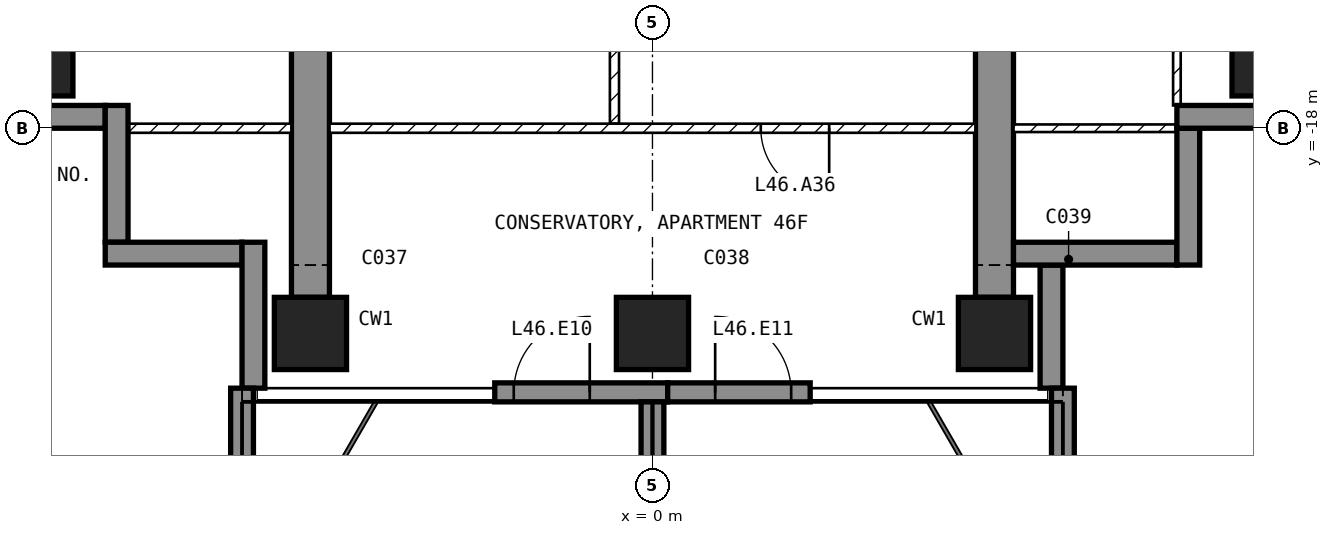
"""IFC4 building model, lengths in metres.
Left out: names, types, materials, properties, quantities, classifications, styles, units other than length and angle.
Written with IfcOpenShell. Run it as: python <this file> out.ifc"""

import sys

from ifc_helpers import new_model, si_unit, direction, frame, frame_2d, origin, origin_2d, place, context, subcontext, project, spatial, polyline, rectangle, outline, extrude, element, fill, save


model = new_model("IFC4")
c1 = context("Model", 3, precision=1e-05, world=origin(), true_north=direction((0.0, 1.0)))
c2 = subcontext(c1, "Body", "Model", "MODEL_VIEW")
j1 = project(units=[si_unit("LENGTHUNIT", "METRE"), si_unit("PLANEANGLEUNIT", "RADIAN")], contexts=[c1])
p1 = place(None, origin())
s1 = spatial("IfcSite", under=j1, at=p1, CompositionType="ELEMENT")
p2 = place(p1, origin())
s2 = spatial("IfcBuilding", under=s1, at=p2, CompositionType="ELEMENT")
p3 = place(p2, frame((0.0, 0.0, 187.6)))
s3 = spatial("IfcBuildingStorey", under=s2, at=p3, CompositionType="ELEMENT", Elevation=187.6)
for number, where, z_axis, x_axis in (
    (1, (-8.1, -17.1, -0.25), (0.0, 0.0, 1.0), (1.0, 0.0, 0.0)),
    (2, (-4.5, -20.7, -0.25), (0.0, 0.0, 1.0), (1.0, 0.0, 0.0)),
    (3, (0.0, -20.7, -0.25), (0.0, 0.0, 1.0), (1.0, 0.0, 0.0)),
    (4, (4.5, -20.7, -0.25), (0.0, 0.0, 1.0), (1.0, 0.0, 0.0)),
    (5, (8.1, -17.1, -0.25), (0.0, 0.0, 1.0), (1.0, 0.0, 0.0)),
):
    element("IfcColumn", number, at=place(p3, frame(where, z_axis=z_axis, x_axis=x_axis)), inside=s3, PredefinedType="COLUMN", context=c2, shape_type="SweptSolid", body=[
        extrude(rectangle(XDim=0.95, YDim=0.95, at=origin_2d()), origin(), (0.0, 0.0, 1.0), 3.5),
    ])
for number, where, z_axis, x_axis in (
    (6, (-4.75, -20.225, -0.25), (1.0, 0.0, 0.0), (0.0, 1.0, 0.0)),
    (7, (4.25, -20.225, -0.25), (1.0, 0.0, 0.0), (0.0, 1.0, 0.0)),
):
    element("IfcWall", number, at=place(p3, frame(where, z_axis=z_axis, x_axis=x_axis)), inside=s3, PredefinedType="SHEAR", context=c2, shape_type="SweptSolid", body=[
        extrude(outline(polyline([(0.0, 0.0), (6.725, 0.0), (6.725, 2.65), (9.125, 2.65), (9.125, 0.0), (11.225, 0.0), (11.225, 3.5), (0.0, 3.5), (0.0, 0.0)])), origin(), (0.0, 0.0, 1.0), 0.5),
    ])
p4 = place(p3, frame((-2.075, -21.475, 0.0), z_axis=(0.0, 0.0, 1.0), x_axis=(1.0, 0.0, 0.0)))
e8 = element("IfcWall", 8, at=p4, inside=s3, PredefinedType="SOLIDWALL", context=c2, shape_type="SweptSolid", body=[
    extrude(rectangle(XDim=2.275, YDim=0.25, at=frame_2d((1.137, 0.0))), origin(), (0.0, 0.0, 1.0), 3.25),
])
p5 = place(p4, frame((0.25, 0.0, 0.0)))
e9 = element("IfcOpeningElement", 9, at=p5, cuts=e8, PredefinedType="OPENING", context=c2, shape_type="SweptSolid", body=[
    extrude(rectangle(XDim=1.0, YDim=2.4, at=frame_2d((0.5, 1.2))), frame((0.0, 0.135, 0.0), z_axis=(0.0, -1.0, 0.0), x_axis=(1.0, 0.0, 0.0)), (0.0, 0.0, 1.0), 0.27),
])
p6 = place(p3, frame((0.2, -21.475, 0.0), z_axis=(0.0, 0.0, 1.0), x_axis=(1.0, 0.0, 0.0)))
e10 = element("IfcWall", 10, at=p6, inside=s3, PredefinedType="SOLIDWALL", context=c2, shape_type="SweptSolid", body=[
    extrude(rectangle(XDim=1.875, YDim=0.25, at=frame_2d((0.938, 0.0))), origin(), (0.0, 0.0, 1.0), 3.25),
])
p7 = place(p6, frame((0.625, 0.0, 0.0)))
e11 = element("IfcOpeningElement", 11, at=p7, cuts=e10, PredefinedType="OPENING", context=c2, shape_type="SweptSolid", body=[
    extrude(rectangle(XDim=1.0, YDim=2.4, at=frame_2d((0.5, 1.2))), frame((0.0, 0.135, 0.0), z_axis=(0.0, -1.0, 0.0), x_axis=(1.0, 0.0, 0.0)), (0.0, 0.0, 1.0), 0.27),
])
p8 = place(p3, frame((5.25, -21.42, 0.0), z_axis=(0.0, 0.0, 1.0), x_axis=(0.0, 1.0, 0.0)))
e12 = element("IfcWall", 12, at=p8, inside=s3, PredefinedType="SOLIDWALL", context=c2, shape_type="SweptSolid", body=[
    extrude(rectangle(XDim=1.62, YDim=0.3, at=frame_2d((0.81, 0.0))), origin(), (0.0, 0.0, 1.0), 3.25),
])
p9 = place(p3, frame((4.75, -19.65, 0.0), z_axis=(0.0, 0.0, 1.0), x_axis=(1.0, 0.0, 0.0)))
e13 = element("IfcWall", 13, at=p9, inside=s3, PredefinedType="SOLIDWALL", context=c2, shape_type="SweptSolid", body=[
    extrude(rectangle(XDim=2.15, YDim=0.3, at=frame_2d((1.075, 0.0))), origin(), (0.0, 0.0, 1.0), 3.25),
])
p10 = place(p3, frame((7.05, -19.8, 0.0), z_axis=(0.0, 0.0, 1.0), x_axis=(0.0, 1.0, 0.0)))
e14 = element("IfcWall", 14, at=p10, inside=s3, PredefinedType="SOLIDWALL", context=c2, shape_type="SweptSolid", body=[
    extrude(rectangle(XDim=1.8, YDim=0.3, at=frame_2d((0.9, 0.0))), origin(), (0.0, 0.0, 1.0), 3.25),
])
p11 = place(p3, frame((6.9, -17.85, 0.0), z_axis=(0.0, 0.0, 1.0), x_axis=(1.0, 0.0, 0.0)))
e15 = element("IfcWall", 15, at=p11, inside=s3, PredefinedType="SOLIDWALL", context=c2, shape_type="SweptSolid", body=[
    extrude(rectangle(XDim=1.85, YDim=0.3, at=frame_2d((0.925, 0.0))), origin(), (0.0, 0.0, 1.0), 3.25),
])
p12 = place(p3, frame((-8.75, -17.85, 0.0), z_axis=(0.0, 0.0, 1.0), x_axis=(1.0, 0.0, 0.0)))
e16 = element("IfcWall", 16, at=p12, inside=s3, PredefinedType="SOLIDWALL", context=c2, shape_type="SweptSolid", body=[
    extrude(rectangle(XDim=1.55, YDim=0.3, at=frame_2d((0.775, 0.0))), origin(), (0.0, 0.0, 1.0), 3.25),
])
for number, where, z_axis, x_axis in (
    (17, (-7.05, -17.7, 0.0), (0.0, 0.0, 1.0), (0.0, -1.0, 0.0)),
    (18, (-7.2, -19.65, 0.0), (0.0, 0.0, 1.0), (1.0, 0.0, 0.0)),
):
    element("IfcWall", number, at=place(p3, frame(where, z_axis=z_axis, x_axis=x_axis)), inside=s3, PredefinedType="SOLIDWALL", context=c2, shape_type="SweptSolid", body=[
        extrude(rectangle(XDim=1.8, YDim=0.3, at=frame_2d((0.9, 0.0))), origin(), (0.0, 0.0, 1.0), 3.25),
    ])
p13 = place(p3, frame((-5.25, -19.5, 0.0), z_axis=(0.0, 0.0, 1.0), x_axis=(0.0, -1.0, 0.0)))
e19 = element("IfcWall", 19, at=p13, inside=s3, PredefinedType="SOLIDWALL", context=c2, shape_type="SweptSolid", body=[
    extrude(rectangle(XDim=1.92, YDim=0.3, at=frame_2d((0.96, 0.0))), origin(), (0.0, 0.0, 1.0), 3.25),
])
p14 = place(p3, frame((-5.4, -21.42, 0.0), z_axis=(0.0, 0.0, 1.0), x_axis=(0.0, -1.0, 0.0)))
e20 = element("IfcWall", 20, at=p14, inside=s3, PredefinedType="SOLIDWALL", context=c2, shape_type="SweptSolid", body=[
    extrude(rectangle(XDim=2.88, YDim=0.3, at=frame_2d((1.44, 0.0))), origin(), (0.0, 0.0, 1.0), 3.25),
])
p15 = place(p3, frame((0.0, -21.6, 0.0), z_axis=(0.0, 0.0, 1.0), x_axis=(0.0, -1.0, 0.0)))
e21 = element("IfcWall", 21, at=p15, inside=s3, PredefinedType="SOLIDWALL", context=c2, shape_type="SweptSolid", body=[
    extrude(rectangle(XDim=2.7, YDim=0.3, at=frame_2d((1.35, 0.0))), origin(), (0.0, 0.0, 1.0), 3.25),
])
p16 = place(p3, frame((5.4, -21.42, 0.0), z_axis=(0.0, 0.0, 1.0), x_axis=(0.0, -1.0, 0.0)))
e22 = element("IfcWall", 22, at=p16, inside=s3, PredefinedType="SOLIDWALL", context=c2, shape_type="SweptSolid", body=[
    extrude(rectangle(XDim=2.88, YDim=0.3, at=frame_2d((1.44, 0.0))), origin(), (0.0, 0.0, 1.0), 3.25),
])
p17 = place(p3, frame((-0.5, -17.94, 0.0), z_axis=(0.0, 0.0, 1.0), x_axis=(0.0, 1.0, 0.0)))
e23 = element("IfcWall", 23, at=p17, inside=s3, PredefinedType="PARTITIONING", context=c2, shape_type="SweptSolid", body=[
    extrude(rectangle(XDim=2.88, YDim=0.12, at=frame_2d((1.44, 0.0))), origin(), (0.0, 0.0, 1.0), 3.25),
])
p18 = place(p17, frame((0.99, 0.0, 0.0)))
e24 = element("IfcOpeningElement", 24, at=p18, cuts=e23, PredefinedType="OPENING", context=c2, shape_type="SweptSolid", body=[
    extrude(rectangle(XDim=0.9, YDim=2.1, at=frame_2d((0.45, 1.05))), frame((0.0, 0.07, 0.0), z_axis=(0.0, -1.0, 0.0), x_axis=(1.0, 0.0, 0.0)), (0.0, 0.0, 1.0), 0.14),
])
p19 = place(p3, frame((4.25, -18.0, 0.0), z_axis=(0.0, 0.0, 1.0), x_axis=(-1.0, 0.0, 0.0)))
e25 = element("IfcWall", 25, at=p19, inside=s3, PredefinedType="PARTITIONING", context=c2, shape_type="SweptSolid", body=[
    extrude(rectangle(XDim=8.5, YDim=0.12, at=frame_2d((4.25, 0.0))), origin(), (0.0, 0.0, 1.0), 3.25),
])
p20 = place(p19, frame((1.925, 0.0, 0.0)))
e26 = element("IfcOpeningElement", 26, at=p20, cuts=e25, PredefinedType="OPENING", context=c2, shape_type="SweptSolid", body=[
    extrude(rectangle(XDim=0.9, YDim=2.1, at=frame_2d((0.45, 1.05))), frame((0.0, 0.07, 0.0), z_axis=(0.0, -1.0, 0.0), x_axis=(1.0, 0.0, 0.0)), (0.0, 0.0, 1.0), 0.14),
])
p21 = place(p3, frame((6.9, -17.7, 0.0), z_axis=(0.0, 0.0, 1.0), x_axis=(0.0, 1.0, 0.0)))
e27 = element("IfcWall", 27, at=p21, inside=s3, PredefinedType="PARTITIONING", context=c2, shape_type="SweptSolid", body=[
    extrude(rectangle(XDim=3.25, YDim=0.1, at=frame_2d((1.625, 0.0))), origin(), (0.0, 0.0, 1.0), 3.25),
])
p22 = place(p21, frame((2.05, 0.0, 0.0)))
e28 = element("IfcOpeningElement", 28, at=p22, cuts=e27, PredefinedType="OPENING", context=c2, shape_type="SweptSolid", body=[
    extrude(rectangle(XDim=0.85, YDim=2.1, at=frame_2d((0.425, 1.05))), frame((0.0, 0.06, 0.0), z_axis=(0.0, -1.0, 0.0), x_axis=(1.0, 0.0, 0.0)), (0.0, 0.0, 1.0), 0.12),
])
p23 = place(p3, frame((7.12, -18.0, 0.0), z_axis=(0.0, 0.0, 1.0), x_axis=(-1.0, 0.0, 0.0)))
e29 = element("IfcWall", 29, at=p23, inside=s3, PredefinedType="PARTITIONING", context=c2, shape_type="SweptSolid", body=[
    extrude(rectangle(XDim=2.37, YDim=0.1, at=frame_2d((1.185, 0.0))), origin(), (0.0, 0.0, 1.0), 3.25),
])
p24 = place(p3, frame((-4.75, -18.0, 0.0), z_axis=(0.0, 0.0, 1.0), x_axis=(-1.0, 0.0, 0.0)))
e30 = element("IfcWall", 30, at=p24, inside=s3, PredefinedType="PARTITIONING", context=c2, shape_type="SweptSolid", body=[
    extrude(rectangle(XDim=2.37, YDim=0.12, at=frame_2d((1.185, 0.0))), origin(), (0.0, 0.0, 1.0), 3.25),
])
p25 = place(p5, origin())
e31 = element("IfcDoor", 31, at=p25, inside=s3, OperationType="SINGLE_SWING_RIGHT", PredefinedType="DOOR", context=c2, shape_type="SweptSolid", body=[
    extrude(rectangle(XDim=1.0, YDim=2.4, at=frame_2d((0.5, 1.2))), frame((0.0, 0.025, 0.0), z_axis=(0.0, -1.0, 0.0), x_axis=(1.0, 0.0, 0.0)), (0.0, 0.0, 1.0), 0.05),
])
fill(e9, e31)
p26 = place(p7, origin())
e32 = element("IfcDoor", 32, at=p26, inside=s3, OperationType="SINGLE_SWING_LEFT", PredefinedType="DOOR", context=c2, shape_type="SweptSolid", body=[
    extrude(rectangle(XDim=1.0, YDim=2.4, at=frame_2d((0.5, 1.2))), frame((0.0, 0.025, 0.0), z_axis=(0.0, -1.0, 0.0), x_axis=(1.0, 0.0, 0.0)), (0.0, 0.0, 1.0), 0.05),
])
fill(e11, e32)
p27 = place(p20, origin())
e33 = element("IfcDoor", 33, at=p27, inside=s3, OperationType="SINGLE_SWING_LEFT", PredefinedType="DOOR", context=c2, shape_type="SweptSolid", body=[
    extrude(rectangle(XDim=0.9, YDim=2.1, at=frame_2d((0.45, 1.05))), frame((0.0, 0.025, 0.0), z_axis=(0.0, -1.0, 0.0), x_axis=(1.0, 0.0, 0.0)), (0.0, 0.0, 1.0), 0.05),
])
fill(e26, e33)
save(model, sys.argv[1])
